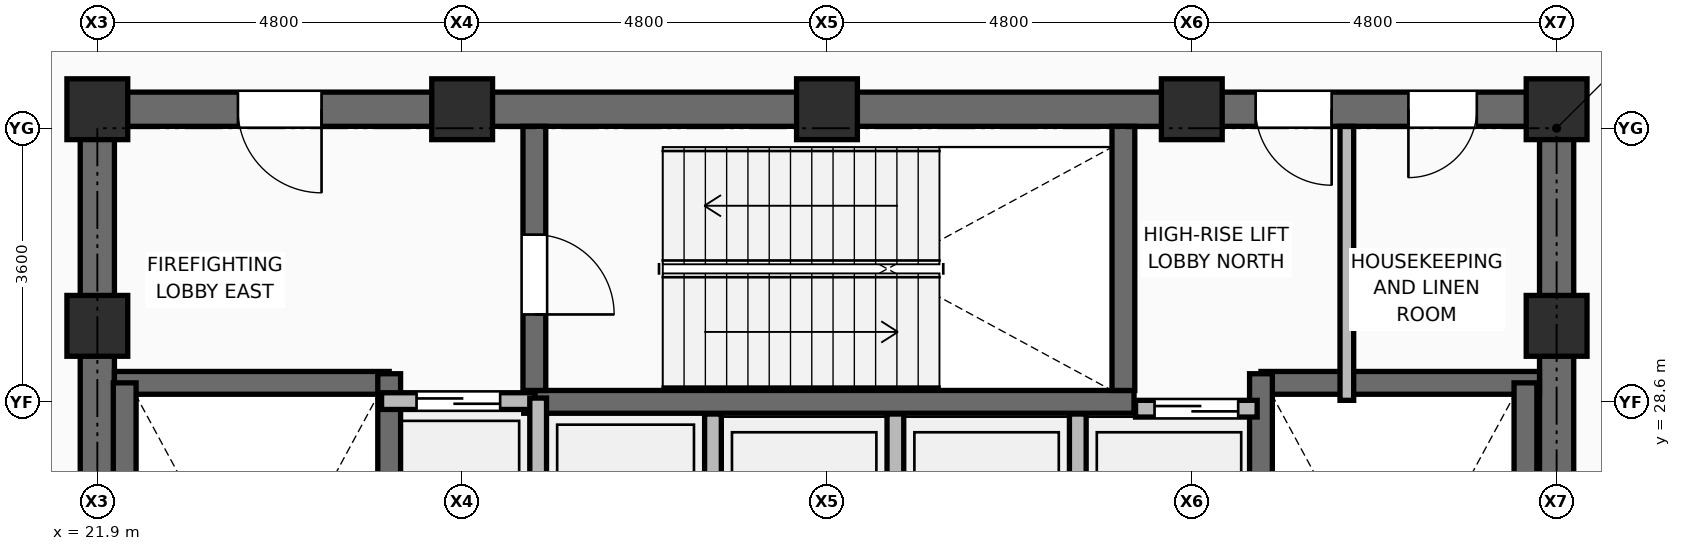
"""IFC4 building model, lengths in metres.
Left out: names, types, materials, properties, quantities, classifications, styles, units other than length and angle.
Written with IfcOpenShell. Run it as: python <this file> out.ifc"""

import sys

from ifc_helpers import new_model, si_unit, direction, frame, frame_2d, origin, origin_2d, place, context, subcontext, project, spatial, rectangle, extrude, element, fill, save


model = new_model("IFC4")
c1 = context("Model", 3, precision=1e-05, world=origin(), true_north=direction((0.0, 1.0)))
c2 = subcontext(c1, "Body", "Model", "MODEL_VIEW")
j1 = project(units=[si_unit("LENGTHUNIT", "METRE"), si_unit("PLANEANGLEUNIT", "RADIAN")], contexts=[c1])
p1 = place(None, origin())
s1 = spatial("IfcSite", under=j1, at=p1, CompositionType="ELEMENT")
p2 = place(p1, origin())
s2 = spatial("IfcBuilding", under=s1, at=p2, CompositionType="ELEMENT")
p3 = place(p2, frame((0.0, 0.0, 181.35)))
s3 = spatial("IfcBuildingStorey", under=s2, at=p3, CompositionType="ELEMENT", Elevation=181.35)
for number, where, z_axis, x_axis in (
    (1, (21.9, 29.6, 0.0), (0.0, 0.0, 1.0), (1.0, 0.0, 0.0)),
    (2, (41.1, 29.6, 0.0), (0.0, 0.0, 1.0), (1.0, 0.0, 0.0)),
    (3, (21.9, 32.45, 0.0), (0.0, 0.0, 1.0), (1.0, 0.0, 0.0)),
    (4, (26.7, 32.45, 0.0), (0.0, 0.0, 1.0), (1.0, 0.0, 0.0)),
    (5, (31.5, 32.45, 0.0), (0.0, 0.0, 1.0), (1.0, 0.0, 0.0)),
    (6, (36.3, 32.45, 0.0), (0.0, 0.0, 1.0), (1.0, 0.0, 0.0)),
    (7, (41.1, 32.45, 0.0), (0.0, 0.0, 1.0), (1.0, 0.0, 0.0)),
):
    element("IfcColumn", number, at=place(p3, frame(where, z_axis=z_axis, x_axis=x_axis)), inside=s3, PredefinedType="COLUMN", context=c2, shape_type="SweptSolid", body=[
        extrude(rectangle(XDim=0.8, YDim=0.8, at=origin_2d()), origin(), (0.0, 0.0, 1.0), 4.8),
    ])
p4 = place(p3, frame((30.0, 25.71, 0.0), z_axis=(0.0, 0.0, 1.0), x_axis=(0.0, 1.0, 0.0)))
e8 = element("IfcWall", 8, at=p4, inside=s3, PredefinedType="PARTITIONING", context=c2, shape_type="SweptSolid", body=[
    extrude(rectangle(XDim=2.73, YDim=0.22, at=frame_2d((1.365, 0.0))), origin(), (0.0, 0.0, 1.0), 4.595),
])
p5 = place(p3, frame((32.4, 26.2, 0.0), z_axis=(0.0, 0.0, 1.0), x_axis=(0.0, 1.0, 0.0)))
e9 = element("IfcWall", 9, at=p5, inside=s3, PredefinedType="PARTITIONING", context=c2, shape_type="SweptSolid", body=[
    extrude(rectangle(XDim=2.24, YDim=0.22, at=frame_2d((1.12, 0.0))), origin(), (0.0, 0.0, 1.0), 4.595),
])
p6 = place(p3, frame((34.8, 26.23, 0.0), z_axis=(0.0, 0.0, 1.0), x_axis=(0.0, 1.0, 0.0)))
e10 = element("IfcWall", 10, at=p6, inside=s3, PredefinedType="PARTITIONING", context=c2, shape_type="SweptSolid", body=[
    extrude(rectangle(XDim=2.21, YDim=0.22, at=frame_2d((1.105, 0.0))), origin(), (0.0, 0.0, 1.0), 4.595),
])
p7 = place(p3, frame((21.675, 32.45, 0.0), z_axis=(0.0, 0.0, 1.0), x_axis=(1.0, 0.0, 0.0)))
e11 = element("IfcWall", 11, at=p7, inside=s3, PredefinedType="SHEAR", context=c2, shape_type="SweptSolid", body=[
    extrude(rectangle(XDim=19.65, YDim=0.45, at=frame_2d((9.825, 0.0))), origin(), (0.0, 0.0, 1.0), 4.62),
])
p8 = place(p7, frame((2.075, 0.0, 0.0)))
e12 = element("IfcOpeningElement", 12, at=p8, cuts=e11, PredefinedType="OPENING", context=c2, shape_type="SweptSolid", body=[
    extrude(rectangle(XDim=1.1, YDim=2.1, at=frame_2d((0.55, 1.05))), frame((0.0, 0.235, 0.0), z_axis=(0.0, -1.0, 0.0), x_axis=(1.0, 0.0, 0.0)), (0.0, 0.0, 1.0), 0.47),
])
p9 = place(p7, frame((15.465, 0.0, 0.0)))
e13 = element("IfcOpeningElement", 13, at=p9, cuts=e11, PredefinedType="OPENING", context=c2, shape_type="SweptSolid", body=[
    extrude(rectangle(XDim=1.0, YDim=2.1, at=frame_2d((0.5, 1.05))), frame((0.0, 0.235, 0.0), z_axis=(0.0, -1.0, 0.0), x_axis=(1.0, 0.0, 0.0)), (0.0, 0.0, 1.0), 0.47),
])
p10 = place(p7, frame((17.475, 0.0, 0.0)))
e14 = element("IfcOpeningElement", 14, at=p10, cuts=e11, PredefinedType="OPENING", context=c2, shape_type="SweptSolid", body=[
    extrude(rectangle(XDim=0.9, YDim=2.1, at=frame_2d((0.45, 1.05))), frame((0.0, 0.235, 0.0), z_axis=(0.0, -1.0, 0.0), x_axis=(1.0, 0.0, 0.0)), (0.0, 0.0, 1.0), 0.47),
])
p11 = place(p3, frame((21.9, 18.025, 0.0), z_axis=(0.0, 0.0, 1.0), x_axis=(0.0, 1.0, 0.0)))
e15 = element("IfcWall", 15, at=p11, inside=s3, PredefinedType="SHEAR", context=c2, shape_type="SweptSolid", body=[
    extrude(rectangle(XDim=14.2, YDim=0.45, at=frame_2d((7.1, 0.0))), origin(), (0.0, 0.0, 1.0), 4.62),
])
p12 = place(p3, frame((41.1, 18.025, 0.0), z_axis=(0.0, 0.0, 1.0), x_axis=(0.0, 1.0, 0.0)))
e16 = element("IfcWall", 16, at=p12, inside=s3, PredefinedType="SHEAR", context=c2, shape_type="SweptSolid", body=[
    extrude(rectangle(XDim=14.2, YDim=0.45, at=frame_2d((7.1, 0.0))), origin(), (0.0, 0.0, 1.0), 4.62),
])
p13 = place(p12, frame((3.435, 0.0, 0.0)))
e17 = element("IfcOpeningElement", 17, at=p13, cuts=e16, PredefinedType="OPENING", context=c2, shape_type="SweptSolid", body=[
    extrude(rectangle(XDim=1.05, YDim=2.1, at=frame_2d((0.525, 1.05))), frame((0.0, 0.235, 0.0), z_axis=(0.0, -1.0, 0.0), x_axis=(1.0, 0.0, 0.0)), (0.0, 0.0, 1.0), 0.47),
])
p14 = place(p3, frame((22.125, 28.85, 0.0), z_axis=(0.0, 0.0, 1.0), x_axis=(1.0, 0.0, 0.0)))
e18 = element("IfcWall", 18, at=p14, inside=s3, PredefinedType="SHEAR", context=c2, shape_type="SweptSolid", body=[
    extrude(rectangle(XDim=3.615, YDim=0.3, at=frame_2d((1.808, 0.0))), origin(), (0.0, 0.0, 1.0), 4.62),
])
p15 = place(p3, frame((25.74, 20.98, 0.0), z_axis=(0.0, 0.0, 1.0), x_axis=(0.0, 1.0, 0.0)))
e19 = element("IfcWall", 19, at=p15, inside=s3, PredefinedType="SHEAR", context=c2, shape_type="SweptSolid", body=[
    extrude(rectangle(XDim=7.99, YDim=0.3, at=frame_2d((3.995, 0.0))), origin(), (0.0, 0.0, 1.0), 4.62),
])
p16 = place(p3, frame((22.26, 21.1, 0.0), z_axis=(0.0, 0.0, 1.0), x_axis=(0.0, 1.0, 0.0)))
e20 = element("IfcWall", 20, at=p16, inside=s3, PredefinedType="SHEAR", context=c2, shape_type="SweptSolid", body=[
    extrude(rectangle(XDim=7.75, YDim=0.3, at=frame_2d((3.875, 0.0))), origin(), (0.0, 0.0, 1.0), 4.62),
])
p17 = place(p3, frame((37.21, 28.85, 0.0), z_axis=(0.0, 0.0, 1.0), x_axis=(1.0, 0.0, 0.0)))
e21 = element("IfcWall", 21, at=p17, inside=s3, PredefinedType="SHEAR", context=c2, shape_type="SweptSolid", body=[
    extrude(rectangle(XDim=3.665, YDim=0.3, at=frame_2d((1.833, 0.0))), origin(), (0.0, 0.0, 1.0), 4.62),
])
p18 = place(p3, frame((37.21, 20.98, 0.0), z_axis=(0.0, 0.0, 1.0), x_axis=(0.0, 1.0, 0.0)))
e22 = element("IfcWall", 22, at=p18, inside=s3, PredefinedType="SHEAR", context=c2, shape_type="SweptSolid", body=[
    extrude(rectangle(XDim=7.99, YDim=0.3, at=frame_2d((3.995, 0.0))), origin(), (0.0, 0.0, 1.0), 4.62),
])
p19 = place(p3, frame((40.69, 22.65, 0.0), z_axis=(0.0, 0.0, 1.0), x_axis=(0.0, 1.0, 0.0)))
e23 = element("IfcWall", 23, at=p19, inside=s3, PredefinedType="SHEAR", context=c2, shape_type="SweptSolid", body=[
    extrude(rectangle(XDim=6.2, YDim=0.3, at=frame_2d((3.1, 0.0))), origin(), (0.0, 0.0, 1.0), 4.62),
])
p20 = place(p3, frame((27.51, 28.6, 0.0), z_axis=(0.0, 0.0, 1.0), x_axis=(1.0, 0.0, 0.0)))
e24 = element("IfcWall", 24, at=p20, inside=s3, PredefinedType="SHEAR", context=c2, shape_type="SweptSolid", body=[
    extrude(rectangle(XDim=8.03, YDim=0.3, at=frame_2d((4.015, 0.0))), origin(), (0.0, 0.0, 1.0), 4.62),
])
p21 = place(p3, frame((27.65, 28.75, 0.0), z_axis=(0.0, 0.0, 1.0), x_axis=(0.0, 1.0, 0.0)))
e25 = element("IfcWall", 25, at=p21, inside=s3, PredefinedType="SHEAR", context=c2, shape_type="SweptSolid", body=[
    extrude(rectangle(XDim=3.475, YDim=0.3, at=frame_2d((1.738, 0.0))), origin(), (0.0, 0.0, 1.0), 4.62),
])
p22 = place(p21, frame((1.0, 0.0, 0.0)))
e26 = element("IfcOpeningElement", 26, at=p22, cuts=e25, PredefinedType="OPENING", context=c2, shape_type="SweptSolid", body=[
    extrude(rectangle(XDim=1.05, YDim=2.1, at=frame_2d((0.525, 1.05))), frame((0.0, 0.16, 0.0), z_axis=(0.0, -1.0, 0.0), x_axis=(1.0, 0.0, 0.0)), (0.0, 0.0, 1.0), 0.32),
])
p23 = place(p3, frame((35.4, 28.75, 0.0), z_axis=(0.0, 0.0, 1.0), x_axis=(0.0, 1.0, 0.0)))
e27 = element("IfcWall", 27, at=p23, inside=s3, PredefinedType="SHEAR", context=c2, shape_type="SweptSolid", body=[
    extrude(rectangle(XDim=3.475, YDim=0.3, at=frame_2d((1.738, 0.0))), origin(), (0.0, 0.0, 1.0), 4.62),
])
p24 = place(p3, frame((25.64, 28.61, 0.0), z_axis=(0.0, 0.0, 1.0), x_axis=(1.0, 0.0, 0.0)))
e28 = element("IfcWall", 28, at=p24, inside=s3, PredefinedType="PARTITIONING", context=c2, shape_type="SweptSolid", body=[
    extrude(rectangle(XDim=2.02, YDim=0.22, at=frame_2d((1.01, 0.0))), origin(), (0.0, 0.0, 1.0), 4.6),
])
p25 = place(p24, frame((0.46, 0.0, 0.0)))
e29 = element("IfcOpeningElement", 29, at=p25, cuts=e28, PredefinedType="OPENING", context=c2, shape_type="SweptSolid", body=[
    extrude(rectangle(XDim=1.1, YDim=2.2, at=frame_2d((0.55, 1.1))), frame((0.0, 0.12, 0.0), z_axis=(0.0, -1.0, 0.0), x_axis=(1.0, 0.0, 0.0)), (0.0, 0.0, 1.0), 0.24),
])
p26 = place(p3, frame((35.56, 28.51, 0.0), z_axis=(0.0, 0.0, 1.0), x_axis=(1.0, 0.0, 0.0)))
e30 = element("IfcWall", 30, at=p26, inside=s3, PredefinedType="PARTITIONING", context=c2, shape_type="SweptSolid", body=[
    extrude(rectangle(XDim=1.6, YDim=0.22, at=frame_2d((0.8, 0.0))), origin(), (0.0, 0.0, 1.0), 4.6),
])
p27 = place(p26, frame((0.25, 0.0, 0.0)))
e31 = element("IfcOpeningElement", 31, at=p27, cuts=e30, PredefinedType="OPENING", context=c2, shape_type="SweptSolid", body=[
    extrude(rectangle(XDim=1.1, YDim=2.2, at=frame_2d((0.55, 1.1))), frame((0.0, 0.12, 0.0), z_axis=(0.0, -1.0, 0.0), x_axis=(1.0, 0.0, 0.0)), (0.0, 0.0, 1.0), 0.24),
])
p28 = place(p3, frame((27.7, 25.65, 0.0), z_axis=(0.0, 0.0, 1.0), x_axis=(0.0, 1.0, 0.0)))
e32 = element("IfcWall", 32, at=p28, inside=s3, PredefinedType="PARTITIONING", context=c2, shape_type="SweptSolid", body=[
    extrude(rectangle(XDim=3.0, YDim=0.22, at=frame_2d((1.5, 0.0))), origin(), (0.0, 0.0, 1.0), 4.6),
])
p29 = place(p3, frame((38.34, 28.62, 0.0), z_axis=(0.0, 0.0, 1.0), x_axis=(0.0, 1.0, 0.0)))
e33 = element("IfcWall", 33, at=p29, inside=s3, PredefinedType="PARTITIONING", context=c2, shape_type="SweptSolid", body=[
    extrude(rectangle(XDim=3.605, YDim=0.18, at=frame_2d((1.802, 0.0))), origin(), (0.0, 0.0, 1.0), 4.6),
])
p30 = place(p22, frame((1.05, 0.0, 0.0), z_axis=(0.0, 0.0, 1.0), x_axis=(-1.0, 0.0, 0.0)))
e34 = element("IfcDoor", 34, at=p30, inside=s3, OperationType="SINGLE_SWING_RIGHT", PredefinedType="DOOR", context=c2, shape_type="SweptSolid", body=[
    extrude(rectangle(XDim=1.05, YDim=2.1, at=frame_2d((0.525, 1.05))), frame((0.0, 0.025, 0.0), z_axis=(0.0, -1.0, 0.0), x_axis=(1.0, 0.0, 0.0)), (0.0, 0.0, 1.0), 0.05),
])
fill(e26, e34)
p31 = place(p25, origin())
e35 = element("IfcDoor", 35, at=p31, inside=s3, OperationType="DOUBLE_DOOR_SLIDING", PredefinedType="DOOR", context=c2, shape_type="SweptSolid", body=[
    extrude(rectangle(XDim=1.1, YDim=2.2, at=frame_2d((0.55, 1.1))), frame((0.0, 0.025, 0.0), z_axis=(0.0, -1.0, 0.0), x_axis=(1.0, 0.0, 0.0)), (0.0, 0.0, 1.0), 0.05),
])
fill(e29, e35)
p32 = place(p27, origin())
e36 = element("IfcDoor", 36, at=p32, inside=s3, OperationType="DOUBLE_DOOR_SLIDING", PredefinedType="DOOR", context=c2, shape_type="SweptSolid", body=[
    extrude(rectangle(XDim=1.1, YDim=2.2, at=frame_2d((0.55, 1.1))), frame((0.0, 0.025, 0.0), z_axis=(0.0, -1.0, 0.0), x_axis=(1.0, 0.0, 0.0)), (0.0, 0.0, 1.0), 0.05),
])
fill(e31, e36)
p33 = place(p8, frame((1.1, 0.0, 0.0), z_axis=(0.0, 0.0, 1.0), x_axis=(-1.0, 0.0, 0.0)))
e37 = element("IfcDoor", 37, at=p33, inside=s3, OperationType="SINGLE_SWING_LEFT", PredefinedType="DOOR", context=c2, shape_type="SweptSolid", body=[
    extrude(rectangle(XDim=1.1, YDim=2.1, at=frame_2d((0.55, 1.05))), frame((0.0, 0.025, 0.0), z_axis=(0.0, -1.0, 0.0), x_axis=(1.0, 0.0, 0.0)), (0.0, 0.0, 1.0), 0.05),
])
fill(e12, e37)
p34 = place(p9, frame((1.0, 0.0, 0.0), z_axis=(0.0, 0.0, 1.0), x_axis=(-1.0, 0.0, 0.0)))
e38 = element("IfcDoor", 38, at=p34, inside=s3, OperationType="SINGLE_SWING_LEFT", PredefinedType="DOOR", context=c2, shape_type="SweptSolid", body=[
    extrude(rectangle(XDim=1.0, YDim=2.1, at=frame_2d((0.5, 1.05))), frame((0.0, 0.025, 0.0), z_axis=(0.0, -1.0, 0.0), x_axis=(1.0, 0.0, 0.0)), (0.0, 0.0, 1.0), 0.05),
])
fill(e13, e38)
p35 = place(p10, frame((0.9, 0.0, 0.0), z_axis=(0.0, 0.0, 1.0), x_axis=(-1.0, 0.0, 0.0)))
e39 = element("IfcDoor", 39, at=p35, inside=s3, OperationType="SINGLE_SWING_RIGHT", PredefinedType="DOOR", context=c2, shape_type="SweptSolid", body=[
    extrude(rectangle(XDim=0.9, YDim=2.1, at=frame_2d((0.45, 1.05))), frame((0.0, 0.025, 0.0), z_axis=(0.0, -1.0, 0.0), x_axis=(1.0, 0.0, 0.0)), (0.0, 0.0, 1.0), 0.05),
])
fill(e14, e39)
save(model, sys.argv[1])
